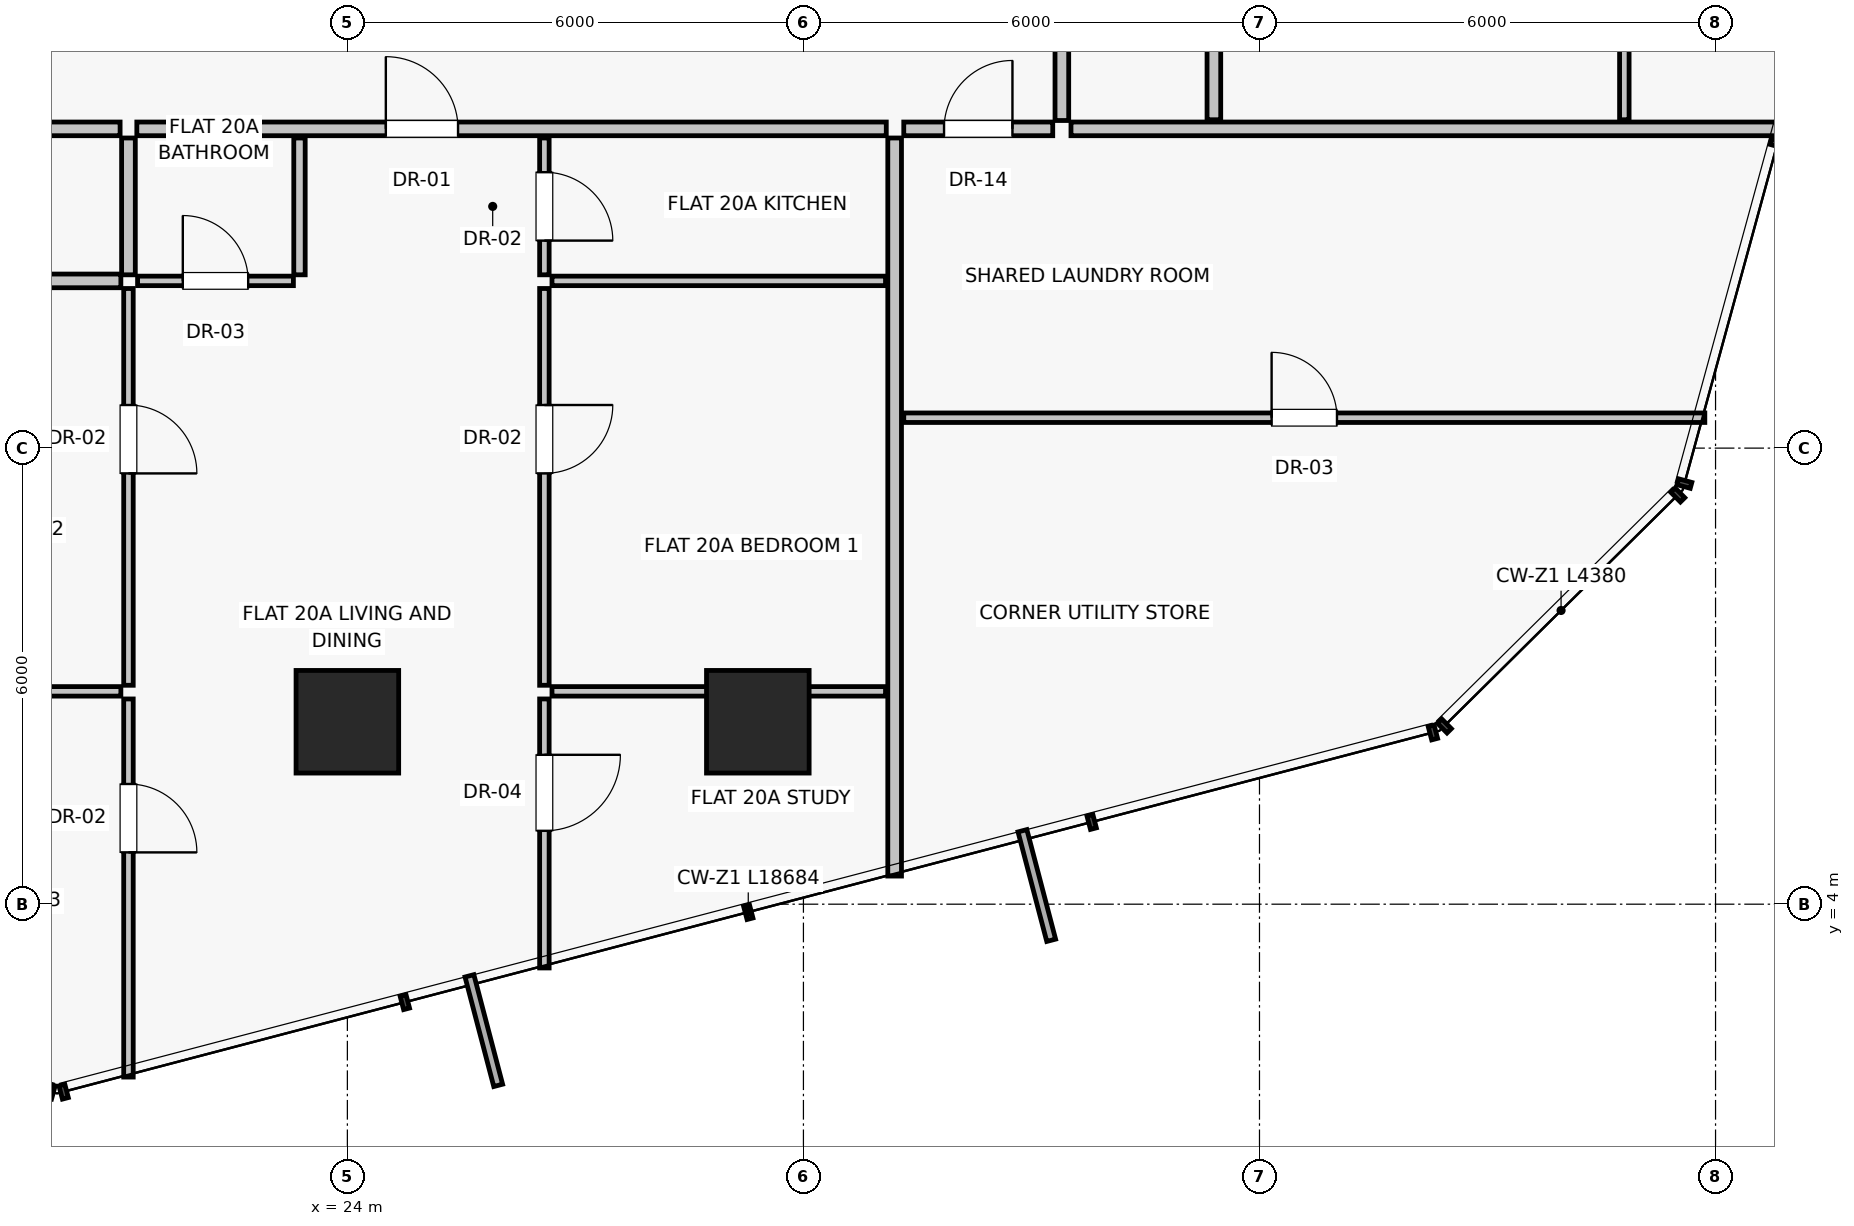
"""IFC4 building model, lengths in metres.
Left out: names, types, materials, properties, quantities, classifications, styles, units other than length and angle.
Written with IfcOpenShell. Run it as: python <this file> out.ifc"""

import sys

from ifc_helpers import new_model, si_unit, direction, frame, frame_2d, origin, origin_2d, place, context, subcontext, project, spatial, rectangle, extrude, source, transform, mapped, element, fill, save


model = new_model("IFC4")
c1 = context("Model", 3, precision=1e-05, world=origin(), true_north=direction((0.0, 1.0)))
c2 = subcontext(c1, "Body", "Model", "MODEL_VIEW")
j1 = project(units=[si_unit("LENGTHUNIT", "METRE"), si_unit("PLANEANGLEUNIT", "RADIAN")], contexts=[c1])
p1 = place(None, origin())
s1 = spatial("IfcSite", under=j1, at=p1, CompositionType="ELEMENT")
p2 = place(p1, origin())
s2 = spatial("IfcBuilding", under=s1, at=p2, CompositionType="ELEMENT")
p3 = place(p2, frame((0.0, 0.0, 73.85)))
s3 = spatial("IfcBuildingStorey", under=s2, at=p3, CompositionType="ELEMENT", Elevation=73.85)
for number, where, z_axis, x_axis in (
    (1, (24.0, 6.4, 0.0), (0.0, 0.0, 1.0), (1.0, 0.0, 0.0)),
    (2, (29.4, 6.4, 0.0), (0.0, 0.0, 1.0), (1.0, 0.0, 0.0)),
):
    element("IfcColumn", number, at=place(p3, frame(where, z_axis=z_axis, x_axis=x_axis)), inside=s3, PredefinedType="COLUMN", context=c2, shape_type="SweptSolid", body=[
        extrude(rectangle(XDim=1.35, YDim=1.35, at=origin_2d()), origin(), (0.0, 0.0, 1.0), 3.25),
    ])
p4 = place(p3, frame((31.2, 14.08, 0.0), z_axis=(0.0, 0.0, 1.0), x_axis=(0.0, -1.0, 0.0)))
e3 = element("IfcWall", 3, at=p4, inside=s3, PredefinedType="PARTITIONING", context=c2, shape_type="SweptSolid", body=[
    extrude(rectangle(XDim=9.71, YDim=0.18, at=frame_2d((4.855, 0.0))), origin(), (0.0, 0.0, 1.0), 3.0),
])
p5 = place(p3, frame((16.91, 14.2, 0.0), z_axis=(0.0, 0.0, 1.0), x_axis=(1.0, 0.0, 0.0)))
e4 = element("IfcWall", 4, at=p5, inside=s3, PredefinedType="PARTITIONING", context=c2, shape_type="SweptSolid", body=[
    extrude(rectangle(XDim=4.1, YDim=0.18, at=frame_2d((2.05, 0.0))), origin(), (0.0, 0.0, 1.0), 3.0),
])
p6 = place(p5, frame((1.55, 0.0, 0.0)))
e5 = element("IfcOpeningElement", 5, at=p6, cuts=e4, PredefinedType="OPENING", context=c2, shape_type="SweptSolid", body=[
    extrude(rectangle(XDim=1.0, YDim=2.01, at=frame_2d((0.5, 1.005))), frame((0.0, 0.1, 0.0), z_axis=(0.0, -1.0, 0.0), x_axis=(1.0, 0.0, 0.0)), (0.0, 0.0, 1.0), 0.2),
])
p7 = place(p3, frame((21.23, 14.2, 0.0), z_axis=(0.0, 0.0, 1.0), x_axis=(1.0, 0.0, 0.0)))
e6 = element("IfcWall", 6, at=p7, inside=s3, PredefinedType="PARTITIONING", context=c2, shape_type="SweptSolid", body=[
    extrude(rectangle(XDim=9.86, YDim=0.18, at=frame_2d((4.93, 0.0))), origin(), (0.0, 0.0, 1.0), 3.0),
])
p8 = place(p7, frame((3.276, 0.0, 0.0)))
e7 = element("IfcOpeningElement", 7, at=p8, cuts=e6, PredefinedType="OPENING", context=c2, shape_type="SweptSolid", body=[
    extrude(rectangle(XDim=0.95, YDim=2.02, at=frame_2d((0.475, 1.01))), frame((0.0, 0.1, 0.0), z_axis=(0.0, -1.0, 0.0), x_axis=(1.0, 0.0, 0.0)), (0.0, 0.0, 1.0), 0.2),
])
p9 = place(p3, frame((16.92, 6.8, 0.0), z_axis=(0.0, 0.0, 1.0), x_axis=(1.0, 0.0, 0.0)))
e8 = element("IfcWall", 8, at=p9, inside=s3, PredefinedType="PARTITIONING", context=c2, shape_type="SweptSolid", body=[
    extrude(rectangle(XDim=4.1, YDim=0.125, at=frame_2d((2.05, 0.0))), origin(), (0.0, 0.0, 1.0), 2.1),
])
p10 = place(p3, frame((21.12, 6.7, 0.0), z_axis=(0.0, 0.0, 1.0), x_axis=(0.0, -1.0, 0.0)))
e9 = element("IfcWall", 9, at=p10, inside=s3, PredefinedType="PARTITIONING", context=c2, shape_type="SweptSolid", body=[
    extrude(rectangle(XDim=4.974, YDim=0.125, at=frame_2d((2.487, 0.0))), origin(), (0.0, 0.0, 1.0), 3.0),
])
p11 = place(p10, frame((1.119, 0.0, 0.0)))
e10 = element("IfcOpeningElement", 10, at=p11, cuts=e9, PredefinedType="OPENING", context=c2, shape_type="SweptSolid", body=[
    extrude(rectangle(XDim=0.9, YDim=2.01, at=frame_2d((0.45, 1.005))), frame((0.0, 0.073, 0.0), z_axis=(0.0, -1.0, 0.0), x_axis=(1.0, 0.0, 0.0)), (0.0, 0.0, 1.0), 0.145),
])
p12 = place(p3, frame((26.692, 6.8, 0.0), z_axis=(0.0, 0.0, 1.0), x_axis=(1.0, 0.0, 0.0)))
e11 = element("IfcWall", 11, at=p12, inside=s3, PredefinedType="PARTITIONING", context=c2, shape_type="SweptSolid", body=[
    extrude(rectangle(XDim=4.388, YDim=0.125, at=frame_2d((2.194, 0.0))), origin(), (0.0, 0.0, 1.0), 2.1),
])
p13 = place(p3, frame((26.592, 6.7, 0.0), z_axis=(0.0, 0.0, 1.0), x_axis=(0.0, -1.0, 0.0)))
e12 = element("IfcWall", 12, at=p13, inside=s3, PredefinedType="PARTITIONING", context=c2, shape_type="SweptSolid", body=[
    extrude(rectangle(XDim=3.539, YDim=0.125, at=frame_2d((1.77, 0.0))), origin(), (0.0, 0.0, 1.0), 3.0),
])
p14 = place(p13, frame((0.735, 0.0, 0.0)))
e13 = element("IfcOpeningElement", 13, at=p14, cuts=e12, PredefinedType="OPENING", context=c2, shape_type="SweptSolid", body=[
    extrude(rectangle(XDim=1.0, YDim=2.01, at=frame_2d((0.5, 1.005))), frame((0.0, 0.073, 0.0), z_axis=(0.0, -1.0, 0.0), x_axis=(1.0, 0.0, 0.0)), (0.0, 0.0, 1.0), 0.145),
])
p15 = place(p3, frame((16.92, 12.2, 0.0), z_axis=(0.0, 0.0, 1.0), x_axis=(1.0, 0.0, 0.0)))
e14 = element("IfcWall", 14, at=p15, inside=s3, PredefinedType="PARTITIONING", context=c2, shape_type="SweptSolid", body=[
    extrude(rectangle(XDim=4.1, YDim=0.18, at=frame_2d((2.05, 0.0))), origin(), (0.0, 0.0, 1.0), 3.0),
])
p16 = place(p3, frame((21.12, 14.08, 0.0), z_axis=(0.0, 0.0, 1.0), x_axis=(0.0, -1.0, 0.0)))
e15 = element("IfcWall", 15, at=p16, inside=s3, PredefinedType="PARTITIONING", context=c2, shape_type="SweptSolid", body=[
    extrude(rectangle(XDim=1.8, YDim=0.18, at=frame_2d((0.9, 0.0))), origin(), (0.0, 0.0, 1.0), 3.0),
])
p17 = place(p3, frame((21.12, 12.1, 0.0), z_axis=(0.0, 0.0, 1.0), x_axis=(0.0, -1.0, 0.0)))
e16 = element("IfcWall", 16, at=p17, inside=s3, PredefinedType="PARTITIONING", context=c2, shape_type="SweptSolid", body=[
    extrude(rectangle(XDim=5.22, YDim=0.125, at=frame_2d((2.61, 0.0))), origin(), (0.0, 0.0, 1.0), 3.0),
])
p18 = place(p17, frame((1.533, 0.0, 0.0)))
e17 = element("IfcOpeningElement", 17, at=p18, cuts=e16, PredefinedType="OPENING", context=c2, shape_type="SweptSolid", body=[
    extrude(rectangle(XDim=0.9, YDim=2.01, at=frame_2d((0.45, 1.005))), frame((0.0, 0.073, 0.0), z_axis=(0.0, -1.0, 0.0), x_axis=(1.0, 0.0, 0.0)), (0.0, 0.0, 1.0), 0.145),
])
p19 = place(p3, frame((23.37, 14.08, 0.0), z_axis=(0.0, 0.0, 1.0), x_axis=(0.0, -1.0, 0.0)))
e18 = element("IfcWall", 18, at=p19, inside=s3, PredefinedType="PARTITIONING", context=c2, shape_type="SweptSolid", body=[
    extrude(rectangle(XDim=1.8, YDim=0.15, at=frame_2d((0.9, 0.0))), origin(), (0.0, 0.0, 1.0), 3.0),
])
p20 = place(p3, frame((21.24, 12.2, 0.0), z_axis=(0.0, 0.0, 1.0), x_axis=(1.0, 0.0, 0.0)))
e19 = element("IfcWall", 19, at=p20, inside=s3, PredefinedType="PARTITIONING", context=c2, shape_type="SweptSolid", body=[
    extrude(rectangle(XDim=2.05, YDim=0.125, at=frame_2d((1.025, 0.0))), origin(), (0.0, 0.0, 1.0), 3.0),
])
p21 = place(p20, frame((0.595, 0.0, 0.0)))
e20 = element("IfcOpeningElement", 20, at=p21, cuts=e19, PredefinedType="OPENING", context=c2, shape_type="SweptSolid", body=[
    extrude(rectangle(XDim=0.86, YDim=2.01, at=frame_2d((0.43, 1.005))), frame((0.0, 0.073, 0.0), z_axis=(0.0, -1.0, 0.0), x_axis=(1.0, 0.0, 0.0)), (0.0, 0.0, 1.0), 0.145),
])
p22 = place(p3, frame((26.592, 14.08, 0.0), z_axis=(0.0, 0.0, 1.0), x_axis=(0.0, -1.0, 0.0)))
e21 = element("IfcWall", 21, at=p22, inside=s3, PredefinedType="PARTITIONING", context=c2, shape_type="SweptSolid", body=[
    extrude(rectangle(XDim=1.8, YDim=0.125, at=frame_2d((0.9, 0.0))), origin(), (0.0, 0.0, 1.0), 3.0),
])
p23 = place(p22, frame((0.45, 0.0, 0.0)))
e22 = element("IfcOpeningElement", 22, at=p23, cuts=e21, PredefinedType="OPENING", context=c2, shape_type="SweptSolid", body=[
    extrude(rectangle(XDim=0.9, YDim=2.01, at=frame_2d((0.45, 1.005))), frame((0.0, 0.073, 0.0), z_axis=(0.0, -1.0, 0.0), x_axis=(1.0, 0.0, 0.0)), (0.0, 0.0, 1.0), 0.145),
])
p24 = place(p3, frame((26.692, 12.2, 0.0), z_axis=(0.0, 0.0, 1.0), x_axis=(1.0, 0.0, 0.0)))
e23 = element("IfcWall", 23, at=p24, inside=s3, PredefinedType="PARTITIONING", context=c2, shape_type="SweptSolid", body=[
    extrude(rectangle(XDim=4.388, YDim=0.125, at=frame_2d((2.194, 0.0))), origin(), (0.0, 0.0, 1.0), 3.0),
])
p25 = place(p3, frame((26.592, 12.1, 0.0), z_axis=(0.0, 0.0, 1.0), x_axis=(0.0, -1.0, 0.0)))
e24 = element("IfcWall", 24, at=p25, inside=s3, PredefinedType="PARTITIONING", context=c2, shape_type="SweptSolid", body=[
    extrude(rectangle(XDim=5.22, YDim=0.125, at=frame_2d((2.61, 0.0))), origin(), (0.0, 0.0, 1.0), 3.0),
])
p26 = place(p25, frame((1.533, 0.0, 0.0)))
e25 = element("IfcOpeningElement", 25, at=p26, cuts=e24, PredefinedType="OPENING", context=c2, shape_type="SweptSolid", body=[
    extrude(rectangle(XDim=0.9, YDim=2.01, at=frame_2d((0.45, 1.005))), frame((0.0, 0.073, 0.0), z_axis=(0.0, -1.0, 0.0), x_axis=(1.0, 0.0, 0.0)), (0.0, 0.0, 1.0), 0.145),
])
p27 = place(p3, frame((33.52, 14.2, 0.0), z_axis=(0.0, 0.0, 1.0), x_axis=(1.0, 0.0, 0.0)))
e26 = element("IfcWall", 26, at=p27, inside=s3, PredefinedType="PARTITIONING", context=c2, shape_type="SweptSolid", body=[
    extrude(rectangle(XDim=9.378, YDim=0.18, at=frame_2d((4.689, 0.0))), origin(), (0.0, 0.0, 1.0), 3.0),
])
p28 = place(p3, frame((33.4, 14.31, 0.0), z_axis=(0.0, 0.0, 1.0), x_axis=(0.0, 1.0, 0.0)))
e27 = element("IfcWall", 27, at=p28, inside=s3, PredefinedType="PARTITIONING", context=c2, shape_type="SweptSolid", body=[
    extrude(rectangle(XDim=4.18, YDim=0.18, at=frame_2d((2.09, 0.0))), origin(), (0.0, 0.0, 1.0), 3.0),
])
p29 = place(p28, frame((1.59, 0.0, 0.0)))
e28 = element("IfcOpeningElement", 28, at=p29, cuts=e27, PredefinedType="OPENING", context=c2, shape_type="SweptSolid", body=[
    extrude(rectangle(XDim=1.0, YDim=2.01, at=frame_2d((0.5, 1.005))), frame((0.0, 0.1, 0.0), z_axis=(0.0, -1.0, 0.0), x_axis=(1.0, 0.0, 0.0)), (0.0, 0.0, 1.0), 0.2),
])
p30 = place(p3, frame((40.8, 14.32, 0.0), z_axis=(0.0, 0.0, 1.0), x_axis=(0.0, 1.0, 0.0)))
e29 = element("IfcWall", 29, at=p30, inside=s3, PredefinedType="PARTITIONING", context=c2, shape_type="SweptSolid", body=[
    extrude(rectangle(XDim=4.18, YDim=0.125, at=frame_2d((2.09, 0.0))), origin(), (0.0, 0.0, 1.0), 3.0),
])
p31 = place(p3, frame((35.4, 14.32, 0.0), z_axis=(0.0, 0.0, 1.0), x_axis=(0.0, 1.0, 0.0)))
e30 = element("IfcWall", 30, at=p31, inside=s3, PredefinedType="PARTITIONING", context=c2, shape_type="SweptSolid", body=[
    extrude(rectangle(XDim=4.18, YDim=0.18, at=frame_2d((2.09, 0.0))), origin(), (0.0, 0.0, 1.0), 3.0),
])
p32 = place(p3, frame((31.32, 14.2, 0.0), z_axis=(0.0, 0.0, 1.0), x_axis=(1.0, 0.0, 0.0)))
e31 = element("IfcWall", 31, at=p32, inside=s3, PredefinedType="PARTITIONING", context=c2, shape_type="SweptSolid", body=[
    extrude(rectangle(XDim=1.96, YDim=0.18, at=frame_2d((0.98, 0.0))), origin(), (0.0, 0.0, 1.0), 3.0),
])
p33 = place(p32, frame((0.53, 0.0, 0.0)))
e32 = element("IfcOpeningElement", 32, at=p33, cuts=e31, PredefinedType="OPENING", context=c2, shape_type="SweptSolid", body=[
    extrude(rectangle(XDim=0.9, YDim=2.01, at=frame_2d((0.45, 1.005))), frame((0.0, 0.1, 0.0), z_axis=(0.0, -1.0, 0.0), x_axis=(1.0, 0.0, 0.0)), (0.0, 0.0, 1.0), 0.2),
])
p34 = place(p3, frame((31.32, 10.4, 0.0), z_axis=(0.0, 0.0, 1.0), x_axis=(1.0, 0.0, 0.0)))
e33 = element("IfcWall", 33, at=p34, inside=s3, PredefinedType="PARTITIONING", context=c2, shape_type="SweptSolid", body=[
    extrude(rectangle(XDim=10.539, YDim=0.125, at=frame_2d((5.27, 0.0))), origin(), (0.0, 0.0, 1.0), 3.0),
])
p35 = place(p34, frame((4.84, 0.0, 0.0)))
e34 = element("IfcOpeningElement", 34, at=p35, cuts=e33, PredefinedType="OPENING", context=c2, shape_type="SweptSolid", body=[
    extrude(rectangle(XDim=0.86, YDim=2.01, at=frame_2d((0.43, 1.005))), frame((0.0, 0.073, 0.0), z_axis=(0.0, -1.0, 0.0), x_axis=(1.0, 0.0, 0.0)), (0.0, 0.0, 1.0), 0.145),
])
m1 = source(origin(), c2, "Body", "SweptSolid", [
    extrude(rectangle(XDim=0.95, YDim=2.02, at=frame_2d((0.475, 1.01))), frame((0.0, 0.025, 0.0), z_axis=(0.0, -1.0, 0.0), x_axis=(1.0, 0.0, 0.0)), (0.0, 0.0, 1.0), 0.05),
])
p36 = place(p8, origin())
e35 = element("IfcDoor", 35, at=p36, inside=s3, OperationType="SINGLE_SWING_LEFT", PredefinedType="DOOR", context=c2, shape_type="MappedRepresentation", body=[
    mapped(m1, transform((0.0, 0.0, 0.0), scale=1.0)),
])
fill(e7, e35)
m2 = source(origin(), c2, "Body", "SweptSolid", [
    extrude(rectangle(XDim=0.9, YDim=2.01, at=frame_2d((0.45, 1.005))), frame((0.0, 0.025, 0.0), z_axis=(0.0, -1.0, 0.0), x_axis=(1.0, 0.0, 0.0)), (0.0, 0.0, 1.0), 0.05),
])
p37 = place(p11, origin())
e36 = element("IfcDoor", 36, at=p37, inside=s3, OperationType="SINGLE_SWING_RIGHT", PredefinedType="DOOR", context=c2, shape_type="MappedRepresentation", body=[
    mapped(m2, transform((0.0, 0.0, 0.0), scale=1.0)),
])
fill(e10, e36)
m3 = source(origin(), c2, "Body", "SweptSolid", [
    extrude(rectangle(XDim=1.0, YDim=2.01, at=frame_2d((0.5, 1.005))), frame((0.0, 0.025, 0.0), z_axis=(0.0, -1.0, 0.0), x_axis=(1.0, 0.0, 0.0)), (0.0, 0.0, 1.0), 0.05),
])
p38 = place(p14, origin())
e37 = element("IfcDoor", 37, at=p38, inside=s3, OperationType="SINGLE_SWING_LEFT", PredefinedType="DOOR", context=c2, shape_type="MappedRepresentation", body=[
    mapped(m3, transform((0.0, 0.0, 0.0), scale=1.0)),
])
fill(e13, e37)
p39 = place(p18, origin())
e38 = element("IfcDoor", 38, at=p39, inside=s3, OperationType="SINGLE_SWING_RIGHT", PredefinedType="DOOR", context=c2, shape_type="MappedRepresentation", body=[
    mapped(m2, transform((0.0, 0.0, 0.0), scale=1.0)),
])
fill(e17, e38)
m4 = source(origin(), c2, "Body", "SweptSolid", [
    extrude(rectangle(XDim=0.86, YDim=2.01, at=frame_2d((0.43, 1.005))), frame((0.0, 0.025, 0.0), z_axis=(0.0, -1.0, 0.0), x_axis=(1.0, 0.0, 0.0)), (0.0, 0.0, 1.0), 0.05),
])
p40 = place(p21, origin())
e39 = element("IfcDoor", 39, at=p40, inside=s3, OperationType="SINGLE_SWING_LEFT", PredefinedType="DOOR", context=c2, shape_type="MappedRepresentation", body=[
    mapped(m4, transform((0.0, 0.0, 0.0), scale=1.0)),
])
fill(e20, e39)
p41 = place(p23, origin())
e40 = element("IfcDoor", 40, at=p41, inside=s3, OperationType="SINGLE_SWING_RIGHT", PredefinedType="DOOR", context=c2, shape_type="MappedRepresentation", body=[
    mapped(m2, transform((0.0, 0.0, 0.0), scale=1.0)),
])
fill(e22, e40)
p42 = place(p26, origin())
e41 = element("IfcDoor", 41, at=p42, inside=s3, OperationType="SINGLE_SWING_LEFT", PredefinedType="DOOR", context=c2, shape_type="MappedRepresentation", body=[
    mapped(m2, transform((0.0, 0.0, 0.0), scale=1.0)),
])
fill(e25, e41)
p43 = place(p33, origin())
e42 = element("IfcDoor", 42, at=p43, inside=s3, OperationType="SINGLE_SWING_RIGHT", PredefinedType="DOOR", context=c2, shape_type="MappedRepresentation", body=[
    mapped(m2, transform((0.0, 0.0, 0.0), scale=1.0)),
])
fill(e32, e42)
p44 = place(p35, origin())
e43 = element("IfcDoor", 43, at=p44, inside=s3, OperationType="SINGLE_SWING_LEFT", PredefinedType="DOOR", context=c2, shape_type="MappedRepresentation", body=[
    mapped(m4, transform((0.0, 0.0, 0.0), scale=1.0)),
])
fill(e34, e43)
save(model, sys.argv[1])
